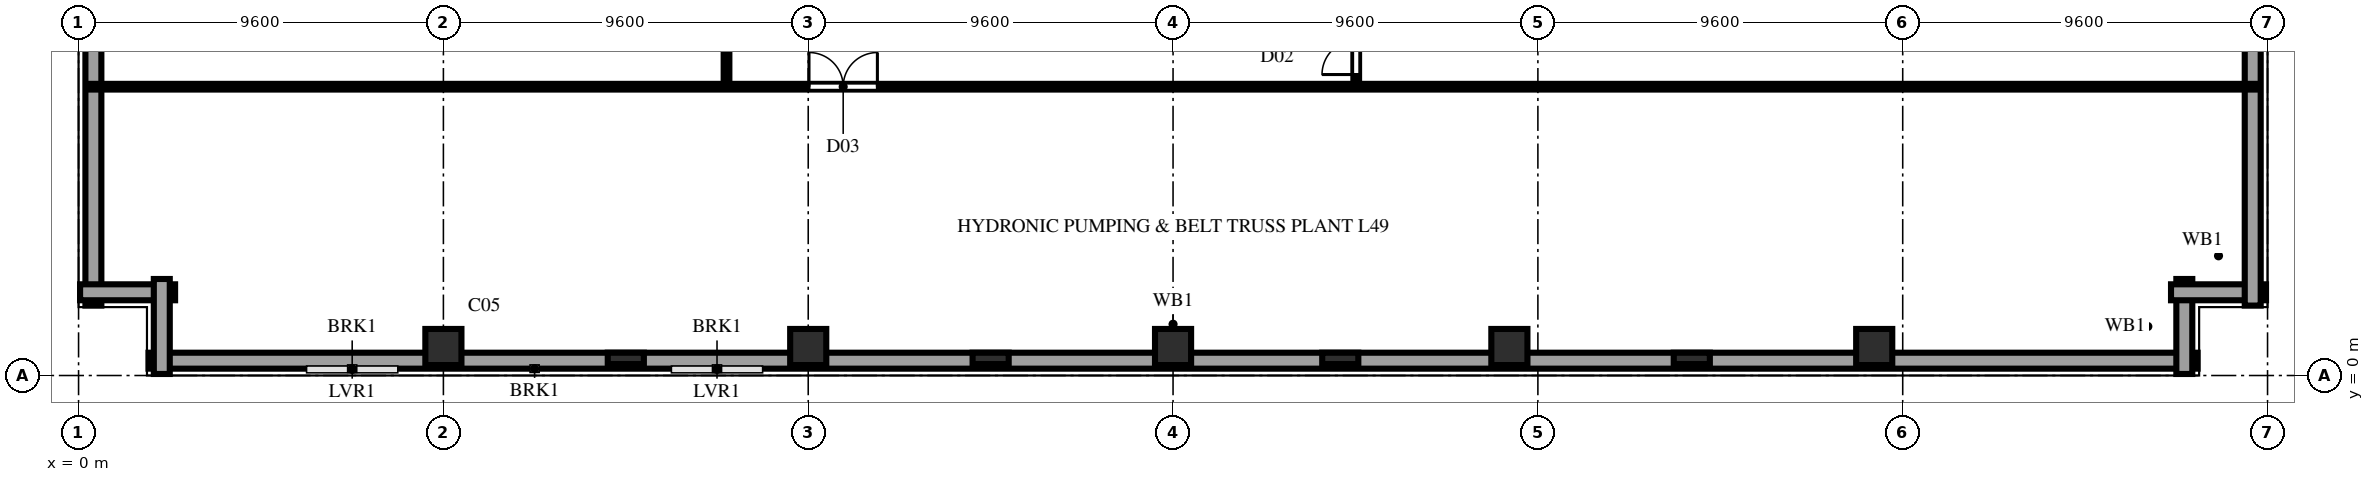
"""IFC4 building model, lengths in metres.
Left out: names, types, materials, properties, quantities, classifications, styles, units other than length and angle.
Written with IfcOpenShell. Run it as: python <this file> out.ifc"""

import sys

from ifc_helpers import new_model, si_unit, direction, frame, frame_2d, origin, origin_2d, place, context, subcontext, project, spatial, rectangle, extrude, element, fill, save


model = new_model("IFC4")
c1 = context("Model", 3, precision=1e-05, world=origin(), true_north=direction((0.0, 1.0)))
c2 = subcontext(c1, "Body", "Model", "MODEL_VIEW")
j1 = project(units=[si_unit("LENGTHUNIT", "METRE"), si_unit("PLANEANGLEUNIT", "RADIAN")], contexts=[c1])
p1 = place(None, origin())
s1 = spatial("IfcSite", under=j1, at=p1, CompositionType="ELEMENT")
p2 = place(p1, origin())
s2 = spatial("IfcBuilding", under=s1, at=p2, CompositionType="ELEMENT")
p3 = place(p2, frame((0.0, 0.0, 194.0)))
s3 = spatial("IfcBuildingStorey", under=s2, at=p3, CompositionType="ELEMENT", Elevation=194.0)
for number, where, z_axis, x_axis in (
    (1, (9.6, 0.75, 0.0), (0.0, 0.0, 1.0), (1.0, 0.0, 0.0)),
    (2, (19.2, 0.75, 0.0), (0.0, 0.0, 1.0), (1.0, 0.0, 0.0)),
    (3, (28.8, 0.75, 0.0), (0.0, 0.0, 1.0), (1.0, 0.0, 0.0)),
    (4, (37.65, 0.75, 0.0), (0.0, 0.0, 1.0), (1.0, 0.0, 0.0)),
    (5, (47.25, 0.75, 0.0), (0.0, 0.0, 1.0), (1.0, 0.0, 0.0)),
):
    element("IfcColumn", number, at=place(p3, frame(where, z_axis=z_axis, x_axis=x_axis)), inside=s3, PredefinedType="COLUMN", context=c2, shape_type="SweptSolid", body=[
        extrude(rectangle(XDim=0.95, YDim=0.95, at=origin_2d()), origin(), (0.0, 0.0, 1.0), 5.0),
    ])
for number, where, z_axis, x_axis in (
    (6, (14.4, 0.45, 0.0), (0.0, 0.0, 1.0), (1.0, 0.0, 0.0)),
    (7, (24.0, 0.45, 0.0), (0.0, 0.0, 1.0), (1.0, 0.0, 0.0)),
    (8, (33.2, 0.45, 0.0), (0.0, 0.0, 1.0), (1.0, 0.0, 0.0)),
    (9, (42.45, 0.45, 0.0), (0.0, 0.0, 1.0), (1.0, 0.0, 0.0)),
):
    element("IfcColumn", number, at=place(p3, frame(where, z_axis=z_axis, x_axis=x_axis)), inside=s3, PredefinedType="PILASTER", context=c2, shape_type="SweptSolid", body=[
        extrude(rectangle(XDim=0.95, YDim=0.3, at=origin_2d()), origin(), (0.0, 0.0, 1.0), 5.0),
    ])
p4 = place(p3, frame((1.84, 0.39, 0.0), z_axis=(0.0, 0.0, 1.0), x_axis=(1.0, 0.0, 0.0)))
e10 = element("IfcWall", 10, at=p4, inside=s3, PredefinedType="SOLIDWALL", context=c2, shape_type="SweptSolid", body=[
    extrude(rectangle(XDim=53.92, YDim=0.42, at=frame_2d((26.96, 0.0))), origin(), (0.0, 0.0, 1.0), 4.74),
])
for number, where, z_axis, x_axis in (
    (11, (55.41, 0.04, 0.0), (0.0, 0.0, 1.0), (0.0, 1.0, 0.0)),
    (12, (55.06, 2.19, 0.0), (0.0, 0.0, 1.0), (1.0, 0.0, 0.0)),
):
    element("IfcWall", number, at=place(p3, frame(where, z_axis=z_axis, x_axis=x_axis)), inside=s3, PredefinedType="SOLIDWALL", context=c2, shape_type="SweptSolid", body=[
        extrude(rectangle(XDim=2.5, YDim=0.42, at=frame_2d((1.25, 0.0))), origin(), (0.0, 0.0, 1.0), 4.74),
    ])
p5 = place(p3, frame((57.21, 1.84, 0.0), z_axis=(0.0, 0.0, 1.0), x_axis=(0.0, 1.0, 0.0)))
e13 = element("IfcWall", 13, at=p5, inside=s3, PredefinedType="SOLIDWALL", context=c2, shape_type="SweptSolid", body=[
    extrude(rectangle(XDim=34.72, YDim=0.42, at=frame_2d((17.36, 0.0))), origin(), (0.0, 0.0, 1.0), 4.74),
])
p6 = place(p3, frame((0.39, 65.36, 0.0), z_axis=(0.0, 0.0, 1.0), x_axis=(0.0, -1.0, 0.0)))
e14 = element("IfcWall", 14, at=p6, inside=s3, PredefinedType="SOLIDWALL", context=c2, shape_type="SweptSolid", body=[
    extrude(rectangle(XDim=63.52, YDim=0.42, at=frame_2d((31.76, 0.0))), origin(), (0.0, 0.0, 1.0), 4.74),
])
for number, where, z_axis, x_axis in (
    (15, (0.04, 2.19, 0.0), (0.0, 0.0, 1.0), (1.0, 0.0, 0.0)),
    (16, (2.19, 2.54, 0.0), (0.0, 0.0, 1.0), (0.0, -1.0, 0.0)),
):
    element("IfcWall", number, at=place(p3, frame(where, z_axis=z_axis, x_axis=x_axis)), inside=s3, PredefinedType="SOLIDWALL", context=c2, shape_type="SweptSolid", body=[
        extrude(rectangle(XDim=2.5, YDim=0.42, at=frame_2d((1.25, 0.0))), origin(), (0.0, 0.0, 1.0), 4.74),
    ])
p7 = place(p3, frame((17.05, 7.6, 0.0), z_axis=(0.0, 0.0, 1.0), x_axis=(0.0, 1.0, 0.0)))
e17 = element("IfcWall", 17, at=p7, inside=s3, PredefinedType="PARTITIONING", context=c2, shape_type="SweptSolid", body=[
    extrude(rectangle(XDim=2.0, YDim=0.15, at=frame_2d((1.0, 0.0))), origin(), (0.0, 0.0, 1.0), 4.74),
])
p8 = place(p3, frame((0.22, 7.6, 0.0), z_axis=(0.0, 0.0, 1.0), x_axis=(1.0, 0.0, 0.0)))
e18 = element("IfcWall", 18, at=p8, inside=s3, PredefinedType="PARTITIONING", context=c2, shape_type="SweptSolid", body=[
    extrude(rectangle(XDim=57.16, YDim=0.15, at=frame_2d((28.58, 0.0))), origin(), (0.0, 0.0, 1.0), 4.74),
])
p9 = place(p8, frame((19.0, 0.0, 0.0)))
e19 = element("IfcOpeningElement", 19, at=p9, cuts=e18, PredefinedType="OPENING", context=c2, shape_type="SweptSolid", body=[
    extrude(rectangle(XDim=1.8, YDim=2.2, at=frame_2d((0.9, 1.1))), frame((0.0, 0.087, 0.0), z_axis=(0.0, -1.0, 0.0), x_axis=(1.0, 0.0, 0.0)), (0.0, 0.0, 1.0), 0.174),
])
p10 = place(p3, frame((33.62, 7.6, 0.0), z_axis=(0.0, 0.0, 1.0), x_axis=(0.0, 1.0, 0.0)))
e20 = element("IfcWall", 20, at=p10, inside=s3, PredefinedType="PARTITIONING", context=c2, shape_type="SweptSolid", body=[
    extrude(rectangle(XDim=2.45, YDim=0.15, at=frame_2d((1.225, 0.0))), origin(), (0.0, 0.0, 1.0), 4.74),
])
p11 = place(p10, frame((0.32, 0.0, 0.0)))
e21 = element("IfcOpeningElement", 21, at=p11, cuts=e20, PredefinedType="OPENING", context=c2, shape_type="SweptSolid", body=[
    extrude(rectangle(XDim=1.8, YDim=2.2, at=frame_2d((0.9, 1.1))), frame((0.0, 0.087, 0.0), z_axis=(0.0, -1.0, 0.0), x_axis=(1.0, 0.0, 0.0)), (0.0, 0.0, 1.0), 0.174),
])
p12 = place(p9, origin())
e22 = element("IfcDoor", 22, at=p12, inside=s3, OperationType="DOUBLE_DOOR_SINGLE_SWING", PredefinedType="DOOR", context=c2, shape_type="SweptSolid", body=[
    extrude(rectangle(XDim=1.8, YDim=2.2, at=frame_2d((0.9, 1.1))), frame((0.0, 0.025, 0.0), z_axis=(0.0, -1.0, 0.0), x_axis=(1.0, 0.0, 0.0)), (0.0, 0.0, 1.0), 0.05),
])
fill(e19, e22)
p13 = place(p11, origin())
e23 = element("IfcDoor", 23, at=p13, inside=s3, OperationType="DOUBLE_DOOR_SINGLE_SWING", PredefinedType="DOOR", context=c2, shape_type="SweptSolid", body=[
    extrude(rectangle(XDim=1.8, YDim=2.2, at=frame_2d((0.9, 1.1))), frame((0.0, 0.025, 0.0), z_axis=(0.0, -1.0, 0.0), x_axis=(1.0, 0.0, 0.0)), (0.0, 0.0, 1.0), 0.05),
])
fill(e21, e23)
save(model, sys.argv[1])
